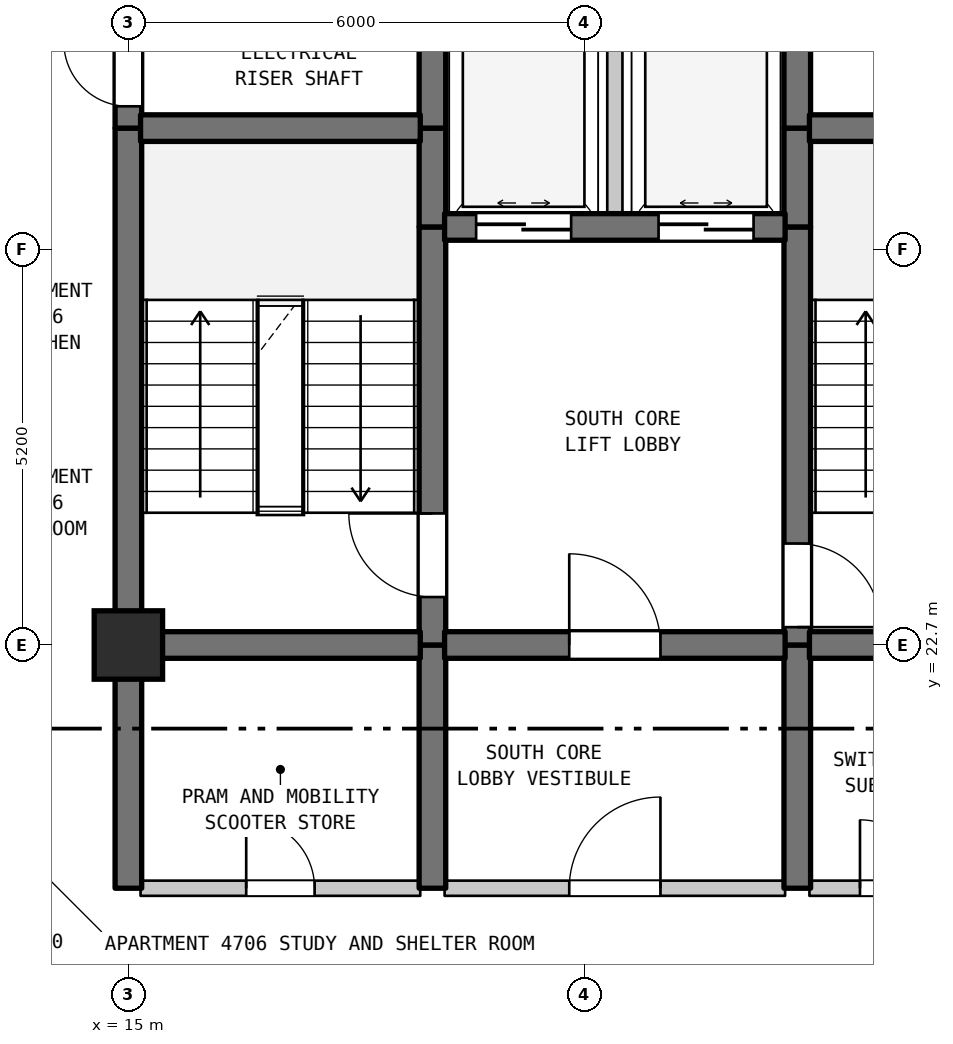
"""IFC4 building model, lengths in metres.
Left out: names, types, materials, properties, quantities, classifications, styles, units other than length and angle.
Written with IfcOpenShell. Run it as: python <this file> out.ifc"""

import sys

from ifc_helpers import new_model, si_unit, direction, frame, frame_2d, origin, origin_2d, place, context, subcontext, project, spatial, rectangle, extrude, element, fill, save


model = new_model("IFC4")
c1 = context("Model", 3, precision=1e-05, world=origin(), true_north=direction((0.0, 1.0)))
c2 = subcontext(c1, "Body", "Model", "MODEL_VIEW")
j1 = project(units=[si_unit("LENGTHUNIT", "METRE"), si_unit("PLANEANGLEUNIT", "RADIAN")], contexts=[c1])
p1 = place(None, origin())
s1 = spatial("IfcSite", under=j1, at=p1, CompositionType="ELEMENT")
p2 = place(p1, origin())
s2 = spatial("IfcBuilding", under=s1, at=p2, CompositionType="ELEMENT")
p3 = place(p2, frame((0.0, 0.0, 192.1)))
s3 = spatial("IfcBuildingStorey", under=s2, at=p3, CompositionType="ELEMENT", Elevation=192.1)
p4 = place(p3, frame((15.0, 22.7, 0.0), z_axis=(0.0, 0.0, 1.0), x_axis=(1.0, 0.0, 0.0)))
e1 = element("IfcColumn", 1, at=p4, inside=s3, PredefinedType="COLUMN", context=c2, shape_type="SweptSolid", body=[
    extrude(rectangle(XDim=0.9, YDim=0.9, at=origin_2d()), origin(), (0.0, 0.0, 1.0), 3.7),
])
p5 = place(p3, frame((15.0, 19.5, 0.0), z_axis=(0.0, 0.0, 1.0), x_axis=(0.0, 1.0, 0.0)))
e2 = element("IfcWall", 2, at=p5, inside=s3, PredefinedType="SHEAR", context=c2, shape_type="SweptSolid", body=[
    extrude(rectangle(XDim=3.2, YDim=0.35, at=frame_2d((1.6, 0.0))), origin(), (0.0, 0.0, 1.0), 3.39),
])
p6 = place(p3, frame((15.0, 22.7, 0.0), z_axis=(0.0, 0.0, 1.0), x_axis=(0.0, 1.0, 0.0)))
e3 = element("IfcWall", 3, at=p6, inside=s3, PredefinedType="SHEAR", context=c2, shape_type="SweptSolid", body=[
    extrude(rectangle(XDim=6.8, YDim=0.35, at=frame_2d((3.4, 0.0))), origin(), (0.0, 0.0, 1.0), 3.39),
])
p7 = place(p3, frame((15.0, 29.5, 0.0), z_axis=(0.0, 0.0, 1.0), x_axis=(0.0, 1.0, 0.0)))
e4 = element("IfcWall", 4, at=p7, inside=s3, PredefinedType="SHEAR", context=c2, shape_type="SweptSolid", body=[
    extrude(rectangle(XDim=1.6, YDim=0.35, at=frame_2d((0.8, 0.0))), origin(), (0.0, 0.0, 1.0), 3.39),
])
p8 = place(p7, frame((0.287, 0.0, 0.0)))
e5 = element("IfcOpeningElement", 5, at=p8, cuts=e4, PredefinedType="OPENING", context=c2, shape_type="SweptSolid", body=[
    extrude(rectangle(XDim=0.85, YDim=2.1, at=frame_2d((0.425, 1.05))), frame((0.0, 0.185, 0.0), z_axis=(0.0, -1.0, 0.0), x_axis=(1.0, 0.0, 0.0)), (0.0, 0.0, 1.0), 0.37),
])
p9 = place(p3, frame((19.0, 19.5, 0.0), z_axis=(0.0, 0.0, 1.0), x_axis=(0.0, 1.0, 0.0)))
e6 = element("IfcWall", 6, at=p9, inside=s3, PredefinedType="SHEAR", context=c2, shape_type="SweptSolid", body=[
    extrude(rectangle(XDim=3.2, YDim=0.35, at=frame_2d((1.6, 0.0))), origin(), (0.0, 0.0, 1.0), 3.39),
])
p10 = place(p3, frame((19.0, 22.7, 0.0), z_axis=(0.0, 0.0, 1.0), x_axis=(0.0, 1.0, 0.0)))
e7 = element("IfcWall", 7, at=p10, inside=s3, PredefinedType="SHEAR", context=c2, shape_type="SweptSolid", body=[
    extrude(rectangle(XDim=5.5, YDim=0.35, at=frame_2d((2.75, 0.0))), origin(), (0.0, 0.0, 1.0), 3.39),
])
p11 = place(p10, frame((0.631, 0.0, 0.0)))
e8 = element("IfcOpeningElement", 8, at=p11, cuts=e7, PredefinedType="OPENING", context=c2, shape_type="SweptSolid", body=[
    extrude(rectangle(XDim=1.1, YDim=2.15, at=frame_2d((0.55, 1.075))), frame((0.0, 0.185, 0.0), z_axis=(0.0, -1.0, 0.0), x_axis=(1.0, 0.0, 0.0)), (0.0, 0.0, 1.0), 0.37),
])
p12 = place(p3, frame((19.0, 28.2, 0.0), z_axis=(0.0, 0.0, 1.0), x_axis=(0.0, 1.0, 0.0)))
e9 = element("IfcWall", 9, at=p12, inside=s3, PredefinedType="SHEAR", context=c2, shape_type="SweptSolid", body=[
    extrude(rectangle(XDim=1.3, YDim=0.35, at=frame_2d((0.65, 0.0))), origin(), (0.0, 0.0, 1.0), 3.39),
])
p13 = place(p3, frame((19.0, 29.5, 0.0), z_axis=(0.0, 0.0, 1.0), x_axis=(0.0, 1.0, 0.0)))
e10 = element("IfcWall", 10, at=p13, inside=s3, PredefinedType="SHEAR", context=c2, shape_type="SweptSolid", body=[
    extrude(rectangle(XDim=5.5, YDim=0.35, at=frame_2d((2.75, 0.0))), origin(), (0.0, 0.0, 1.0), 3.39),
])
p14 = place(p13, frame((2.025, 0.0, 0.0)))
e11 = element("IfcOpeningElement", 11, at=p14, cuts=e10, PredefinedType="OPENING", context=c2, shape_type="SweptSolid", body=[
    extrude(rectangle(XDim=1.1, YDim=2.15, at=frame_2d((0.55, 1.075))), frame((0.0, 0.185, 0.0), z_axis=(0.0, -1.0, 0.0), x_axis=(1.0, 0.0, 0.0)), (0.0, 0.0, 1.0), 0.37),
])
p15 = place(p3, frame((21.4, 28.2, 0.0), z_axis=(0.0, 0.0, 1.0), x_axis=(0.0, 1.0, 0.0)))
e12 = element("IfcWall", 12, at=p15, inside=s3, PredefinedType="STANDARD", context=c2, shape_type="SweptSolid", body=[
    extrude(rectangle(XDim=2.6, YDim=0.2, at=frame_2d((1.3, 0.0))), origin(), (0.0, 0.0, 1.0), 3.39),
])
p16 = place(p3, frame((23.8, 19.5, 0.0), z_axis=(0.0, 0.0, 1.0), x_axis=(0.0, 1.0, 0.0)))
e13 = element("IfcWall", 13, at=p16, inside=s3, PredefinedType="SHEAR", context=c2, shape_type="SweptSolid", body=[
    extrude(rectangle(XDim=3.2, YDim=0.35, at=frame_2d((1.6, 0.0))), origin(), (0.0, 0.0, 1.0), 3.39),
])
p17 = place(p3, frame((23.8, 22.7, 0.0), z_axis=(0.0, 0.0, 1.0), x_axis=(0.0, 1.0, 0.0)))
e14 = element("IfcWall", 14, at=p17, inside=s3, PredefinedType="SHEAR", context=c2, shape_type="SweptSolid", body=[
    extrude(rectangle(XDim=5.5, YDim=0.35, at=frame_2d((2.75, 0.0))), origin(), (0.0, 0.0, 1.0), 3.39),
])
p18 = place(p17, frame((0.235, 0.0, 0.0)))
e15 = element("IfcOpeningElement", 15, at=p18, cuts=e14, PredefinedType="OPENING", context=c2, shape_type="SweptSolid", body=[
    extrude(rectangle(XDim=1.1, YDim=2.15, at=frame_2d((0.55, 1.075))), frame((0.0, 0.185, 0.0), z_axis=(0.0, -1.0, 0.0), x_axis=(1.0, 0.0, 0.0)), (0.0, 0.0, 1.0), 0.37),
])
for number, where, z_axis, x_axis in (
    (16, (23.8, 28.2, 0.0), (0.0, 0.0, 1.0), (0.0, 1.0, 0.0)),
    (17, (23.8, 29.5, 0.0), (0.0, 0.0, 1.0), (0.0, 1.0, 0.0)),
):
    element("IfcWall", number, at=place(p3, frame(where, z_axis=z_axis, x_axis=x_axis)), inside=s3, PredefinedType="SHEAR", context=c2, shape_type="SweptSolid", body=[
        extrude(rectangle(XDim=1.3, YDim=0.35, at=frame_2d((0.65, 0.0))), origin(), (0.0, 0.0, 1.0), 3.39),
    ])
p19 = place(p3, frame((15.16, 19.5, 0.0), z_axis=(0.0, 0.0, 1.0), x_axis=(1.0, 0.0, 0.0)))
e18 = element("IfcWall", 18, at=p19, inside=s3, PredefinedType="STANDARD", context=c2, shape_type="SweptSolid", body=[
    extrude(rectangle(XDim=3.68, YDim=0.2, at=frame_2d((1.84, 0.0))), origin(), (0.0, 0.0, 1.0), 3.39),
])
p20 = place(p19, frame((1.39, 0.0, 0.0)))
e19 = element("IfcOpeningElement", 19, at=p20, cuts=e18, PredefinedType="OPENING", context=c2, shape_type="SweptSolid", body=[
    extrude(rectangle(XDim=0.9, YDim=2.15, at=frame_2d((0.45, 1.075))), frame((0.0, 0.11, 0.0), z_axis=(0.0, -1.0, 0.0), x_axis=(1.0, 0.0, 0.0)), (0.0, 0.0, 1.0), 0.22),
])
p21 = place(p3, frame((19.16, 19.5, 0.0), z_axis=(0.0, 0.0, 1.0), x_axis=(1.0, 0.0, 0.0)))
e20 = element("IfcWall", 20, at=p21, inside=s3, PredefinedType="STANDARD", context=c2, shape_type="SweptSolid", body=[
    extrude(rectangle(XDim=4.48, YDim=0.2, at=frame_2d((2.24, 0.0))), origin(), (0.0, 0.0, 1.0), 3.39),
])
p22 = place(p21, frame((1.64, 0.0, 0.0)))
e21 = element("IfcOpeningElement", 21, at=p22, cuts=e20, PredefinedType="OPENING", context=c2, shape_type="SweptSolid", body=[
    extrude(rectangle(XDim=1.2, YDim=2.2, at=frame_2d((0.6, 1.1))), frame((0.0, 0.11, 0.0), z_axis=(0.0, -1.0, 0.0), x_axis=(1.0, 0.0, 0.0)), (0.0, 0.0, 1.0), 0.22),
])
p23 = place(p3, frame((23.96, 19.5, 0.0), z_axis=(0.0, 0.0, 1.0), x_axis=(1.0, 0.0, 0.0)))
e22 = element("IfcWall", 22, at=p23, inside=s3, PredefinedType="STANDARD", context=c2, shape_type="SweptSolid", body=[
    extrude(rectangle(XDim=4.455, YDim=0.2, at=frame_2d((2.228, 0.0))), origin(), (0.0, 0.0, 1.0), 3.39),
])
p24 = place(p23, frame((0.665, 0.0, 0.0)))
e23 = element("IfcOpeningElement", 23, at=p24, cuts=e22, PredefinedType="OPENING", context=c2, shape_type="SweptSolid", body=[
    extrude(rectangle(XDim=0.9, YDim=2.15, at=frame_2d((0.45, 1.075))), frame((0.0, 0.11, 0.0), z_axis=(0.0, -1.0, 0.0), x_axis=(1.0, 0.0, 0.0)), (0.0, 0.0, 1.0), 0.22),
])
p25 = place(p23, frame((2.791, 0.0, 0.0)))
e24 = element("IfcOpeningElement", 24, at=p25, cuts=e22, PredefinedType="OPENING", context=c2, shape_type="SweptSolid", body=[
    extrude(rectangle(XDim=0.9, YDim=2.15, at=frame_2d((0.45, 1.075))), frame((0.0, 0.11, 0.0), z_axis=(0.0, -1.0, 0.0), x_axis=(1.0, 0.0, 0.0)), (0.0, 0.0, 1.0), 0.22),
])
p26 = place(p3, frame((15.16, 22.7, 0.0), z_axis=(0.0, 0.0, 1.0), x_axis=(1.0, 0.0, 0.0)))
e25 = element("IfcWall", 25, at=p26, inside=s3, PredefinedType="SHEAR", context=c2, shape_type="SweptSolid", body=[
    extrude(rectangle(XDim=3.68, YDim=0.35, at=frame_2d((1.84, 0.0))), origin(), (0.0, 0.0, 1.0), 3.39),
])
p27 = place(p3, frame((19.16, 22.7, 0.0), z_axis=(0.0, 0.0, 1.0), x_axis=(1.0, 0.0, 0.0)))
e26 = element("IfcWall", 26, at=p27, inside=s3, PredefinedType="SHEAR", context=c2, shape_type="SweptSolid", body=[
    extrude(rectangle(XDim=4.48, YDim=0.35, at=frame_2d((2.24, 0.0))), origin(), (0.0, 0.0, 1.0), 3.39),
])
p28 = place(p27, frame((1.64, 0.0, 0.0)))
e27 = element("IfcOpeningElement", 27, at=p28, cuts=e26, PredefinedType="OPENING", context=c2, shape_type="SweptSolid", body=[
    extrude(rectangle(XDim=1.2, YDim=2.2, at=frame_2d((0.6, 1.1))), frame((0.0, 0.185, 0.0), z_axis=(0.0, -1.0, 0.0), x_axis=(1.0, 0.0, 0.0)), (0.0, 0.0, 1.0), 0.37),
])
p29 = place(p3, frame((23.96, 22.7, 0.0), z_axis=(0.0, 0.0, 1.0), x_axis=(1.0, 0.0, 0.0)))
e28 = element("IfcWall", 28, at=p29, inside=s3, PredefinedType="SHEAR", context=c2, shape_type="SweptSolid", body=[
    extrude(rectangle(XDim=3.18, YDim=0.35, at=frame_2d((1.59, 0.0))), origin(), (0.0, 0.0, 1.0), 3.39),
])
p30 = place(p3, frame((19.16, 28.2, 0.0), z_axis=(0.0, 0.0, 1.0), x_axis=(1.0, 0.0, 0.0)))
e29 = element("IfcWall", 29, at=p30, inside=s3, PredefinedType="SHEAR", context=c2, shape_type="SweptSolid", body=[
    extrude(rectangle(XDim=4.48, YDim=0.35, at=frame_2d((2.24, 0.0))), origin(), (0.0, 0.0, 1.0), 3.39),
])
p31 = place(p30, frame((0.415, 0.0, 0.0)))
e30 = element("IfcOpeningElement", 30, at=p31, cuts=e29, PredefinedType="OPENING", context=c2, shape_type="SweptSolid", body=[
    extrude(rectangle(XDim=1.25, YDim=2.2, at=frame_2d((0.625, 1.1))), frame((0.0, 0.185, 0.0), z_axis=(0.0, -1.0, 0.0), x_axis=(1.0, 0.0, 0.0)), (0.0, 0.0, 1.0), 0.37),
])
p32 = place(p30, frame((2.815, 0.0, 0.0)))
e31 = element("IfcOpeningElement", 31, at=p32, cuts=e29, PredefinedType="OPENING", context=c2, shape_type="SweptSolid", body=[
    extrude(rectangle(XDim=1.25, YDim=2.2, at=frame_2d((0.625, 1.1))), frame((0.0, 0.185, 0.0), z_axis=(0.0, -1.0, 0.0), x_axis=(1.0, 0.0, 0.0)), (0.0, 0.0, 1.0), 0.37),
])
p33 = place(p3, frame((15.16, 29.5, 0.0), z_axis=(0.0, 0.0, 1.0), x_axis=(1.0, 0.0, 0.0)))
e32 = element("IfcWall", 32, at=p33, inside=s3, PredefinedType="SHEAR", context=c2, shape_type="SweptSolid", body=[
    extrude(rectangle(XDim=3.68, YDim=0.35, at=frame_2d((1.84, 0.0))), origin(), (0.0, 0.0, 1.0), 3.39),
])
p34 = place(p3, frame((23.96, 29.5, 0.0), z_axis=(0.0, 0.0, 1.0), x_axis=(1.0, 0.0, 0.0)))
e33 = element("IfcWall", 33, at=p34, inside=s3, PredefinedType="SHEAR", context=c2, shape_type="SweptSolid", body=[
    extrude(rectangle(XDim=3.18, YDim=0.35, at=frame_2d((1.59, 0.0))), origin(), (0.0, 0.0, 1.0), 3.39),
])
p35 = place(p8, origin())
e34 = element("IfcDoor", 34, at=p35, inside=s3, OperationType="SINGLE_SWING_RIGHT", PredefinedType="DOOR", context=c2, shape_type="SweptSolid", body=[
    extrude(rectangle(XDim=0.85, YDim=2.1, at=frame_2d((0.425, 1.05))), frame((0.0, 0.025, 0.0), z_axis=(0.0, -1.0, 0.0), x_axis=(1.0, 0.0, 0.0)), (0.0, 0.0, 1.0), 0.05),
])
fill(e5, e34)
p36 = place(p11, origin())
e35 = element("IfcDoor", 35, at=p36, inside=s3, OperationType="SINGLE_SWING_RIGHT", PredefinedType="DOOR", context=c2, shape_type="SweptSolid", body=[
    extrude(rectangle(XDim=1.1, YDim=2.15, at=frame_2d((0.55, 1.075))), frame((0.0, 0.025, 0.0), z_axis=(0.0, -1.0, 0.0), x_axis=(1.0, 0.0, 0.0)), (0.0, 0.0, 1.0), 0.05),
])
fill(e8, e35)
p37 = place(p18, frame((1.1, 0.0, 0.0), z_axis=(0.0, 0.0, 1.0), x_axis=(-1.0, 0.0, 0.0)))
e36 = element("IfcDoor", 36, at=p37, inside=s3, OperationType="SINGLE_SWING_LEFT", PredefinedType="DOOR", context=c2, shape_type="SweptSolid", body=[
    extrude(rectangle(XDim=1.1, YDim=2.15, at=frame_2d((0.55, 1.075))), frame((0.0, 0.025, 0.0), z_axis=(0.0, -1.0, 0.0), x_axis=(1.0, 0.0, 0.0)), (0.0, 0.0, 1.0), 0.05),
])
fill(e15, e36)
p38 = place(p20, origin())
e37 = element("IfcDoor", 37, at=p38, inside=s3, OperationType="SINGLE_SWING_LEFT", PredefinedType="DOOR", context=c2, shape_type="SweptSolid", body=[
    extrude(rectangle(XDim=0.9, YDim=2.15, at=frame_2d((0.45, 1.075))), frame((0.0, 0.025, 0.0), z_axis=(0.0, -1.0, 0.0), x_axis=(1.0, 0.0, 0.0)), (0.0, 0.0, 1.0), 0.05),
])
fill(e19, e37)
p39 = place(p22, origin())
e38 = element("IfcDoor", 38, at=p39, inside=s3, OperationType="SINGLE_SWING_RIGHT", PredefinedType="DOOR", context=c2, shape_type="SweptSolid", body=[
    extrude(rectangle(XDim=1.2, YDim=2.2, at=frame_2d((0.6, 1.1))), frame((0.0, 0.025, 0.0), z_axis=(0.0, -1.0, 0.0), x_axis=(1.0, 0.0, 0.0)), (0.0, 0.0, 1.0), 0.05),
])
fill(e21, e38)
p40 = place(p24, origin())
e39 = element("IfcDoor", 39, at=p40, inside=s3, OperationType="SINGLE_SWING_LEFT", PredefinedType="DOOR", context=c2, shape_type="SweptSolid", body=[
    extrude(rectangle(XDim=0.9, YDim=2.15, at=frame_2d((0.45, 1.075))), frame((0.0, 0.025, 0.0), z_axis=(0.0, -1.0, 0.0), x_axis=(1.0, 0.0, 0.0)), (0.0, 0.0, 1.0), 0.05),
])
fill(e23, e39)
p41 = place(p28, origin())
e40 = element("IfcDoor", 40, at=p41, inside=s3, OperationType="SINGLE_SWING_LEFT", PredefinedType="DOOR", context=c2, shape_type="SweptSolid", body=[
    extrude(rectangle(XDim=1.2, YDim=2.2, at=frame_2d((0.6, 1.1))), frame((0.0, 0.025, 0.0), z_axis=(0.0, -1.0, 0.0), x_axis=(1.0, 0.0, 0.0)), (0.0, 0.0, 1.0), 0.05),
])
fill(e27, e40)
p42 = place(p31, origin())
e41 = element("IfcDoor", 41, at=p42, inside=s3, OperationType="DOUBLE_DOOR_SLIDING", PredefinedType="DOOR", context=c2, shape_type="SweptSolid", body=[
    extrude(rectangle(XDim=1.25, YDim=2.2, at=frame_2d((0.625, 1.1))), frame((0.0, 0.025, 0.0), z_axis=(0.0, -1.0, 0.0), x_axis=(1.0, 0.0, 0.0)), (0.0, 0.0, 1.0), 0.05),
])
fill(e30, e41)
p43 = place(p32, origin())
e42 = element("IfcDoor", 42, at=p43, inside=s3, OperationType="DOUBLE_DOOR_SLIDING", PredefinedType="DOOR", context=c2, shape_type="SweptSolid", body=[
    extrude(rectangle(XDim=1.25, YDim=2.2, at=frame_2d((0.625, 1.1))), frame((0.0, 0.025, 0.0), z_axis=(0.0, -1.0, 0.0), x_axis=(1.0, 0.0, 0.0)), (0.0, 0.0, 1.0), 0.05),
])
fill(e31, e42)
save(model, sys.argv[1])
